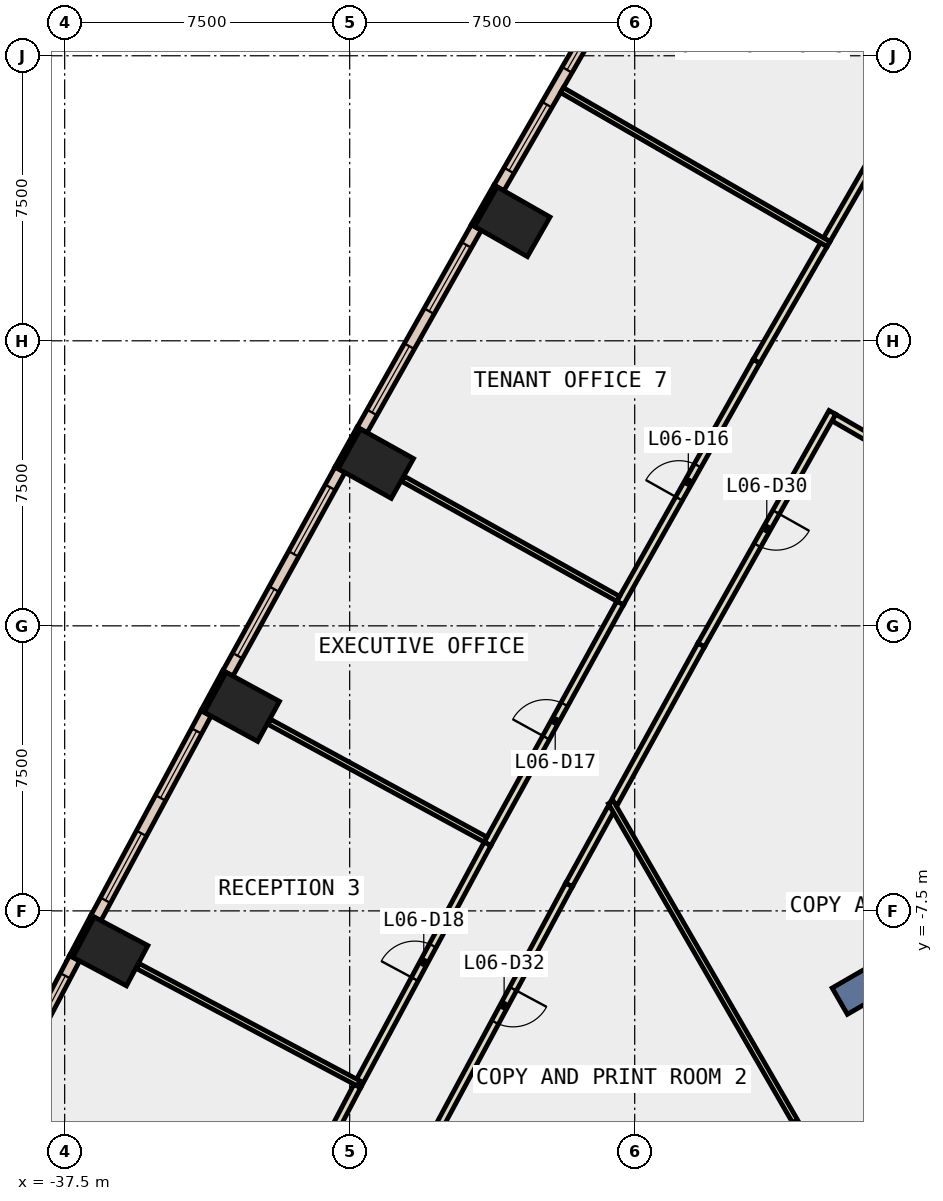
"""IFC4 building model, lengths in metres.
Left out: names, types, materials, properties, quantities, classifications, styles, units other than length and angle.
Written with IfcOpenShell. Run it as: python <this file> out.ifc"""

import sys

from ifc_helpers import new_model, si_unit, direction, frame, frame_2d, origin, origin_2d, place, context, subcontext, project, spatial, rectangle, extrude, element, fill, save


model = new_model("IFC4")
c1 = context("Model", 3, precision=1e-05, world=origin(), true_north=direction((0.0, 1.0)))
c2 = subcontext(c1, "Body", "Model", "MODEL_VIEW")
j1 = project(units=[si_unit("LENGTHUNIT", "METRE"), si_unit("PLANEANGLEUNIT", "RADIAN")], contexts=[c1])
p1 = place(None, origin())
s1 = spatial("IfcSite", under=j1, at=p1, CompositionType="ELEMENT")
p2 = place(p1, origin())
s2 = spatial("IfcBuilding", under=s1, at=p2, CompositionType="ELEMENT")
p3 = place(p2, frame((0.0, 0.0, 35.0)))
s3 = spatial("IfcBuildingStorey", under=s2, at=p3, CompositionType="ELEMENT", Elevation=35.0)
for number, where, z_axis, x_axis in (
    (1, (-25.721, 10.632, -0.6), (0.0, 0.0, 1.0), (0.496, 0.869, 0.0)),
    (2, (-29.311, 4.267, -0.6), (0.0, 0.0, 1.0), (0.487, 0.873, 0.0)),
    (3, (-32.837, -2.132, -0.6), (0.0, 0.0, 1.0), (0.478, 0.878, 0.0)),
    (4, (-36.298, -8.567, -0.6), (0.0, 0.0, 1.0), (0.469, 0.883, 0.0)),
):
    element("IfcColumn", number, at=place(p3, frame(where, z_axis=z_axis, x_axis=x_axis)), inside=s3, PredefinedType="COLUMN", context=c2, shape_type="SweptSolid", body=[
        extrude(rectangle(XDim=1.2, YDim=1.6, at=origin_2d()), origin(), (0.0, 0.0, 1.0), 4.4),
    ])
p4 = place(p3, frame((-9.31, -5.375, -0.6), z_axis=(0.0, 0.0, 1.0), x_axis=(-0.866017533419, -0.500013631625, 0.0)))
e5 = element("IfcWall", 5, at=p4, inside=s3, PredefinedType="SHEAR", context=c2, shape_type="SweptSolid", body=[
    extrude(rectangle(XDim=9.0, YDim=0.8, at=frame_2d((4.5, 0.0))), origin(), (0.0, 0.0, 1.0), 4.4),
])
p5 = place(p3, frame((-26.162, 11.574, 0.0), z_axis=(0.0, 0.0, 1.0), x_axis=(-0.495854054996, -0.868405870629, 0.0)))
e6 = element("IfcWall", 6, at=p5, inside=s3, PredefinedType="STANDARD", context=c2, shape_type="SweptSolid", body=[
    extrude(rectangle(XDim=1.2, YDim=0.1, at=frame_2d((0.6, 0.0))), origin(), (0.0, 0.0, 1.0), 3.8),
])
p6 = place(p3, frame((-29.761, 5.205, 0.0), z_axis=(0.0, 0.0, 1.0), x_axis=(-0.486730996044, -0.87355190887, 0.0)))
e7 = element("IfcWall", 7, at=p6, inside=s3, PredefinedType="STANDARD", context=c2, shape_type="SweptSolid", body=[
    extrude(rectangle(XDim=1.2, YDim=0.1, at=frame_2d((0.6, 0.0))), origin(), (0.0, 0.0, 1.0), 3.8),
])
p7 = place(p3, frame((-33.296, -1.199, 0.0), z_axis=(0.0, 0.0, 1.0), x_axis=(-0.478424520456, -0.878128679765, 0.0)))
e8 = element("IfcWall", 8, at=p7, inside=s3, PredefinedType="STANDARD", context=c2, shape_type="SweptSolid", body=[
    extrude(rectangle(XDim=1.2, YDim=0.1, at=frame_2d((0.6, 0.0))), origin(), (0.0, 0.0, 1.0), 3.8),
])
p8 = place(p3, frame((-36.767, -7.639, 0.0), z_axis=(0.0, 0.0, 1.0), x_axis=(-0.469383408131, -0.882994459876, 0.0)))
e9 = element("IfcWall", 9, at=p8, inside=s3, PredefinedType="STANDARD", context=c2, shape_type="SweptSolid", body=[
    extrude(rectangle(XDim=1.199, YDim=0.1, at=frame_2d((0.6, 0.0))), origin(), (0.0, 0.0, 1.0), 3.8),
])
p9 = place(p3, frame((-23.015, 16.819, 0.0), z_axis=(0.0, 0.0, 1.0), x_axis=(-0.499976985038, -0.866038691071, 0.0)))
e10 = element("IfcWall", 10, at=p9, inside=s3, PredefinedType="STANDARD", context=c2, shape_type="SweptSolid", body=[
    extrude(rectangle(XDim=6.116, YDim=0.3, at=frame_2d((3.058, 0.0))), origin(), (0.0, 0.0, 1.0), 3.8),
])
p10 = place(p9, frame((0.529, 0.0, 0.9)))
e11 = element("IfcOpeningElement", 11, at=p10, cuts=e10, PredefinedType="OPENING", context=c2, shape_type="SweptSolid", body=[
    extrude(rectangle(XDim=2.0, YDim=2.6, at=frame_2d((1.0, 1.3))), frame((0.0, 0.16, 0.0), z_axis=(0.0, -1.0, 0.0), x_axis=(1.0, 0.0, 0.0)), (0.0, 0.0, 1.0), 0.32),
])
p11 = place(p9, frame((3.587, 0.0, 0.9)))
e12 = element("IfcOpeningElement", 12, at=p11, cuts=e10, PredefinedType="OPENING", context=c2, shape_type="SweptSolid", body=[
    extrude(rectangle(XDim=2.0, YDim=2.6, at=frame_2d((1.0, 1.3))), frame((0.0, 0.16, 0.0), z_axis=(0.0, -1.0, 0.0), x_axis=(1.0, 0.0, 0.0)), (0.0, 0.0, 1.0), 0.32),
])
p12 = place(p3, frame((-26.667, 10.482, 0.0), z_axis=(0.0, 0.0, 1.0), x_axis=(-0.491278487323, -0.871002553322, 0.0)))
e13 = element("IfcWall", 13, at=p12, inside=s3, PredefinedType="STANDARD", context=c2, shape_type="SweptSolid", body=[
    extrude(rectangle(XDim=6.117, YDim=0.3, at=frame_2d((3.059, 0.0))), origin(), (0.0, 0.0, 1.0), 3.8),
])
p13 = place(p12, frame((0.529, 0.0, 0.9)))
e14 = element("IfcOpeningElement", 14, at=p13, cuts=e13, PredefinedType="OPENING", context=c2, shape_type="SweptSolid", body=[
    extrude(rectangle(XDim=2.0, YDim=2.6, at=frame_2d((1.0, 1.3))), frame((0.0, 0.16, 0.0), z_axis=(0.0, -1.0, 0.0), x_axis=(1.0, 0.0, 0.0)), (0.0, 0.0, 1.0), 0.32),
])
p14 = place(p12, frame((3.588, 0.0, 0.9)))
e15 = element("IfcOpeningElement", 15, at=p14, cuts=e13, PredefinedType="OPENING", context=c2, shape_type="SweptSolid", body=[
    extrude(rectangle(XDim=2.0, YDim=2.6, at=frame_2d((1.0, 1.3))), frame((0.0, 0.16, 0.0), z_axis=(0.0, -1.0, 0.0), x_axis=(1.0, 0.0, 0.0)), (0.0, 0.0, 1.0), 0.32),
])
p15 = place(p3, frame((-30.255, 4.107, 0.0), z_axis=(0.0, 0.0, 1.0), x_axis=(-0.482596003603, -0.875843078015, 0.0)))
e16 = element("IfcWall", 16, at=p15, inside=s3, PredefinedType="STANDARD", context=c2, shape_type="SweptSolid", body=[
    extrude(rectangle(XDim=6.115, YDim=0.3, at=frame_2d((3.058, 0.0))), origin(), (0.0, 0.0, 1.0), 3.8),
])
p16 = place(p15, frame((0.529, 0.0, 0.9)))
e17 = element("IfcOpeningElement", 17, at=p16, cuts=e16, PredefinedType="OPENING", context=c2, shape_type="SweptSolid", body=[
    extrude(rectangle(XDim=2.0, YDim=2.6, at=frame_2d((1.0, 1.3))), frame((0.0, 0.16, 0.0), z_axis=(0.0, -1.0, 0.0), x_axis=(1.0, 0.0, 0.0)), (0.0, 0.0, 1.0), 0.32),
])
p17 = place(p15, frame((3.586, 0.0, 0.9)))
e18 = element("IfcOpeningElement", 18, at=p17, cuts=e16, PredefinedType="OPENING", context=c2, shape_type="SweptSolid", body=[
    extrude(rectangle(XDim=2.0, YDim=2.6, at=frame_2d((1.0, 1.3))), frame((0.0, 0.16, 0.0), z_axis=(0.0, -1.0, 0.0), x_axis=(1.0, 0.0, 0.0)), (0.0, 0.0, 1.0), 0.32),
])
p18 = place(p3, frame((-33.779, -2.301, 0.0), z_axis=(0.0, 0.0, 1.0), x_axis=(-0.47375467653, -0.880656860795, 0.0)))
e19 = element("IfcWall", 19, at=p18, inside=s3, PredefinedType="STANDARD", context=c2, shape_type="SweptSolid", body=[
    extrude(rectangle(XDim=6.117, YDim=0.3, at=frame_2d((3.059, 0.0))), origin(), (0.0, 0.0, 1.0), 3.8),
])
p19 = place(p18, frame((0.529, 0.0, 0.9)))
e20 = element("IfcOpeningElement", 20, at=p19, cuts=e19, PredefinedType="OPENING", context=c2, shape_type="SweptSolid", body=[
    extrude(rectangle(XDim=2.0, YDim=2.6, at=frame_2d((1.0, 1.3))), frame((0.0, 0.16, 0.0), z_axis=(0.0, -1.0, 0.0), x_axis=(1.0, 0.0, 0.0)), (0.0, 0.0, 1.0), 0.32),
])
p20 = place(p18, frame((3.588, 0.0, 0.9)))
e21 = element("IfcOpeningElement", 21, at=p20, cuts=e19, PredefinedType="OPENING", context=c2, shape_type="SweptSolid", body=[
    extrude(rectangle(XDim=2.0, YDim=2.6, at=frame_2d((1.0, 1.3))), frame((0.0, 0.16, 0.0), z_axis=(0.0, -1.0, 0.0), x_axis=(1.0, 0.0, 0.0)), (0.0, 0.0, 1.0), 0.32),
])
p21 = place(p3, frame((-37.239, -8.746, 0.0), z_axis=(0.0, 0.0, 1.0), x_axis=(-0.464913987781, -0.885355851602, 0.0)))
e22 = element("IfcWall", 22, at=p21, inside=s3, PredefinedType="STANDARD", context=c2, shape_type="SweptSolid", body=[
    extrude(rectangle(XDim=6.094, YDim=0.3, at=frame_2d((3.047, 0.0))), origin(), (0.0, 0.0, 1.0), 3.8),
])
p22 = place(p21, frame((0.523, 0.0, 0.9)))
e23 = element("IfcOpeningElement", 23, at=p22, cuts=e22, PredefinedType="OPENING", context=c2, shape_type="SweptSolid", body=[
    extrude(rectangle(XDim=2.0, YDim=2.6, at=frame_2d((1.0, 1.3))), frame((0.0, 0.16, 0.0), z_axis=(0.0, -1.0, 0.0), x_axis=(1.0, 0.0, 0.0)), (0.0, 0.0, 1.0), 0.32),
])
p23 = place(p21, frame((3.57, 0.0, 0.9)))
e24 = element("IfcOpeningElement", 24, at=p23, cuts=e22, PredefinedType="OPENING", context=c2, shape_type="SweptSolid", body=[
    extrude(rectangle(XDim=2.0, YDim=2.6, at=frame_2d((1.0, 1.3))), frame((0.0, 0.16, 0.0), z_axis=(0.0, -1.0, 0.0), x_axis=(1.0, 0.0, 0.0)), (0.0, 0.0, 1.0), 0.32),
])
p24 = place(p3, frame((-17.261, 5.48, 0.0), z_axis=(0.0, 0.0, 1.0), x_axis=(0.865949187497, -0.500131987253, 0.0)))
e25 = element("IfcWall", 25, at=p24, inside=s3, PredefinedType="PARTITIONING", context=c2, shape_type="SweptSolid", body=[
    extrude(rectangle(XDim=3.939, YDim=0.2, at=frame_2d((1.969, 0.0))), origin(), (0.0, 0.0, 1.0), 3.8),
])
p25 = place(p3, frame((-17.299, 5.617, 0.0), z_axis=(0.0, 0.0, 1.0), x_axis=(-0.491166441632, -0.871065741844, 0.0)))
e26 = element("IfcWall", 26, at=p25, inside=s3, PredefinedType="PARTITIONING", context=c2, shape_type="SweptSolid", body=[
    extrude(rectangle(XDim=7.028, YDim=0.2, at=frame_2d((3.514, 0.0))), origin(), (0.0, 0.0, 1.0), 3.8),
])
p26 = place(p25, frame((3.014, 0.0, 0.0)))
e27 = element("IfcOpeningElement", 27, at=p26, cuts=e26, PredefinedType="OPENING", context=c2, shape_type="SweptSolid", body=[
    extrude(rectangle(XDim=1.0, YDim=2.1, at=frame_2d((0.5, 1.05))), frame((0.0, 0.11, 0.0), z_axis=(0.0, -1.0, 0.0), x_axis=(1.0, 0.0, 0.0)), (0.0, 0.0, 1.0), 0.22),
])
p27 = place(p3, frame((-20.751, -0.505, 0.0), z_axis=(0.0, 0.0, 1.0), x_axis=(-0.482566110981, -0.875859548405, 0.0)))
e28 = element("IfcWall", 28, at=p27, inside=s3, PredefinedType="PARTITIONING", context=c2, shape_type="SweptSolid", body=[
    extrude(rectangle(XDim=4.748, YDim=0.2, at=frame_2d((2.374, 0.0))), origin(), (0.0, 0.0, 1.0), 3.8),
])
p28 = place(p3, frame((-23.114, -4.794, 0.0), z_axis=(0.0, 0.0, 1.0), x_axis=(-0.482482362329, -0.875905685586, 0.0)))
e29 = element("IfcWall", 29, at=p28, inside=s3, PredefinedType="PARTITIONING", context=c2, shape_type="SweptSolid", body=[
    extrude(rectangle(XDim=2.311, YDim=0.2, at=frame_2d((1.156, 0.0))), origin(), (0.0, 0.0, 1.0), 3.8),
])
p29 = place(p3, frame((-24.229, -6.818, 0.0), z_axis=(0.0, 0.0, 1.0), x_axis=(-0.473714049803, -0.88067871498, 0.0)))
e30 = element("IfcWall", 30, at=p29, inside=s3, PredefinedType="PARTITIONING", context=c2, shape_type="SweptSolid", body=[
    extrude(rectangle(XDim=7.209, YDim=0.2, at=frame_2d((3.604, 0.0))), origin(), (0.0, 0.0, 1.0), 3.8),
])
p30 = place(p29, frame((3.104, 0.0, 0.0)))
e31 = element("IfcOpeningElement", 31, at=p30, cuts=e30, PredefinedType="OPENING", context=c2, shape_type="SweptSolid", body=[
    extrude(rectangle(XDim=1.0, YDim=2.1, at=frame_2d((0.5, 1.05))), frame((0.0, 0.11, 0.0), z_axis=(0.0, -1.0, 0.0), x_axis=(1.0, 0.0, 0.0)), (0.0, 0.0, 1.0), 0.22),
])
p31 = place(p3, frame((-17.448, 10.16, 0.0), z_axis=(0.0, 0.0, 1.0), x_axis=(0.499951278228, 0.866053531485, 0.0)))
e32 = element("IfcWall", 32, at=p31, inside=s3, PredefinedType="PARTITIONING", context=c2, shape_type="SweptSolid", body=[
    extrude(rectangle(XDim=3.54, YDim=0.2, at=frame_2d((1.77, 0.0))), origin(), (0.0, 0.0, 1.0), 3.8),
])
p32 = place(p3, frame((-22.884, 0.598, 0.0), z_axis=(0.0, 0.0, 1.0), x_axis=(0.491206176175, 0.871043335597, 0.0)))
e33 = element("IfcWall", 33, at=p32, inside=s3, PredefinedType="PARTITIONING", context=c2, shape_type="SweptSolid", body=[
    extrude(rectangle(XDim=7.309, YDim=0.2, at=frame_2d((3.654, 0.0))), origin(), (0.0, 0.0, 1.0), 3.8),
])
p33 = place(p32, frame((3.154, 0.0, 0.0)))
e34 = element("IfcOpeningElement", 34, at=p33, cuts=e33, PredefinedType="OPENING", context=c2, shape_type="SweptSolid", body=[
    extrude(rectangle(XDim=1.0, YDim=2.1, at=frame_2d((0.5, 1.05))), frame((0.0, 0.11, 0.0), z_axis=(0.0, -1.0, 0.0), x_axis=(1.0, 0.0, 0.0)), (0.0, 0.0, 1.0), 0.22),
])
p34 = place(p3, frame((-19.294, 6.964, 0.0), z_axis=(0.0, 0.0, 1.0), x_axis=(0.499861717316, 0.86610522661, 0.0)))
e35 = element("IfcWall", 35, at=p34, inside=s3, PredefinedType="PARTITIONING", context=c2, shape_type="SweptSolid", body=[
    extrude(rectangle(XDim=3.541, YDim=0.2, at=frame_2d((1.771, 0.0))), origin(), (0.0, 0.0, 1.0), 3.8),
])
p35 = place(p3, frame((-26.373, -5.736, 0.0), z_axis=(0.0, 0.0, 1.0), x_axis=(0.482587313112, 0.875847866483, 0.0)))
e36 = element("IfcWall", 36, at=p35, inside=s3, PredefinedType="PARTITIONING", context=c2, shape_type="SweptSolid", body=[
    extrude(rectangle(XDim=7.232, YDim=0.2, at=frame_2d((3.616, 0.0))), origin(), (0.0, 0.0, 1.0), 3.8),
])
p36 = place(p35, frame((3.191, 0.0, 0.0)))
e37 = element("IfcOpeningElement", 37, at=p36, cuts=e36, PredefinedType="OPENING", context=c2, shape_type="SweptSolid", body=[
    extrude(rectangle(XDim=1.0, YDim=2.1, at=frame_2d((0.5, 1.05))), frame((0.0, 0.11, 0.0), z_axis=(0.0, -1.0, 0.0), x_axis=(1.0, 0.0, 0.0)), (0.0, 0.0, 1.0), 0.22),
])
p37 = place(p3, frame((-29.799, -12.106, 0.0), z_axis=(0.0, 0.0, 1.0), x_axis=(0.473681086062, 0.880696445268, 0.0)))
e38 = element("IfcWall", 38, at=p37, inside=s3, PredefinedType="PARTITIONING", context=c2, shape_type="SweptSolid", body=[
    extrude(rectangle(XDim=7.233, YDim=0.2, at=frame_2d((3.616, 0.0))), origin(), (0.0, 0.0, 1.0), 3.8),
])
p38 = place(p37, frame((3.191, 0.0, 0.0)))
e39 = element("IfcOpeningElement", 39, at=p38, cuts=e38, PredefinedType="OPENING", context=c2, shape_type="SweptSolid", body=[
    extrude(rectangle(XDim=1.0, YDim=2.1, at=frame_2d((0.5, 1.05))), frame((0.0, 0.11, 0.0), z_axis=(0.0, -1.0, 0.0), x_axis=(1.0, 0.0, 0.0)), (0.0, 0.0, 1.0), 0.22),
])
p39 = place(p3, frame((-32.696, -17.626, 0.0), z_axis=(0.0, 0.0, 1.0), x_axis=(0.464767882002, 0.885432558617, 0.0)))
e40 = element("IfcWall", 40, at=p39, inside=s3, PredefinedType="PARTITIONING", context=c2, shape_type="SweptSolid", body=[
    extrude(rectangle(XDim=6.233, YDim=0.2, at=frame_2d((3.117, 0.0))), origin(), (0.0, 0.0, 1.0), 3.8),
])
p40 = place(p39, frame((2.654, 0.0, 0.0)))
e41 = element("IfcOpeningElement", 41, at=p40, cuts=e40, PredefinedType="OPENING", context=c2, shape_type="SweptSolid", body=[
    extrude(rectangle(XDim=1.0, YDim=2.1, at=frame_2d((0.5, 1.05))), frame((0.0, 0.11, 0.0), z_axis=(0.0, -1.0, 0.0), x_axis=(1.0, 0.0, 0.0)), (0.0, 0.0, 1.0), 0.22),
])
p41 = place(p3, frame((-18.182, -13.207, 0.0), z_axis=(0.0, 0.0, 1.0), x_axis=(-0.500081416649, 0.865978392757, 0.0)))
e42 = element("IfcWall", 42, at=p41, inside=s3, PredefinedType="PARTITIONING", context=c2, shape_type="SweptSolid", body=[
    extrude(rectangle(XDim=9.89, YDim=0.15, at=frame_2d((4.945, 0.0))), origin(), (0.0, 0.0, 1.0), 3.8),
])
p42 = place(p3, frame((-18.211, -13.108, 0.0), z_axis=(0.0, 0.0, 1.0), x_axis=(-0.865421721769, -0.501044153235, 0.0)))
e43 = element("IfcWall", 43, at=p42, inside=s3, PredefinedType="PARTITIONING", context=c2, shape_type="SweptSolid", body=[
    extrude(rectangle(XDim=8.546, YDim=0.2, at=frame_2d((4.273, 0.0))), origin(), (0.0, 0.0, 1.0), 3.8),
])
p43 = place(p3, frame((-17.399, 10.045, 0.0), z_axis=(0.0, 0.0, 1.0), x_axis=(-0.865980803489, 0.500077242023, 0.0)))
e44 = element("IfcWall", 44, at=p43, inside=s3, PredefinedType="PARTITIONING", context=c2, shape_type="SweptSolid", body=[
    extrude(rectangle(XDim=8.101, YDim=0.15, at=frame_2d((4.05, 0.0))), origin(), (0.0, 0.0, 1.0), 3.8),
])
p44 = place(p3, frame((-22.935, 0.712, 0.0), z_axis=(0.0, 0.0, 1.0), x_axis=(-0.873395616379, 0.487011393389, 0.0)))
e45 = element("IfcWall", 45, at=p44, inside=s3, PredefinedType="PARTITIONING", context=c2, shape_type="SweptSolid", body=[
    extrude(rectangle(XDim=6.48, YDim=0.15, at=frame_2d((3.24, 0.0))), origin(), (0.0, 0.0, 1.0), 3.8),
])
p45 = place(p3, frame((-26.425, -5.623, 0.0), z_axis=(0.0, 0.0, 1.0), x_axis=(-0.87825523631, 0.478192157919, 0.0)))
e46 = element("IfcWall", 46, at=p45, inside=s3, PredefinedType="PARTITIONING", context=c2, shape_type="SweptSolid", body=[
    extrude(rectangle(XDim=6.481, YDim=0.15, at=frame_2d((3.24, 0.0))), origin(), (0.0, 0.0, 1.0), 3.8),
])
p46 = place(p3, frame((-29.764, -12.04, 0.0), z_axis=(0.0, 0.0, 1.0), x_axis=(-0.883018657393, 0.469337885426, 0.0)))
e47 = element("IfcWall", 47, at=p46, inside=s3, PredefinedType="PARTITIONING", context=c2, shape_type="SweptSolid", body=[
    extrude(rectangle(XDim=6.58, YDim=0.15, at=frame_2d((3.29, 0.0))), origin(), (0.0, 0.0, 1.0), 3.8),
])
p47 = place(p10, origin())
e48 = element("IfcWindow", 48, at=p47, inside=s3, PartitioningType="SINGLE_PANEL", PredefinedType="WINDOW", context=c2, shape_type="SweptSolid", body=[
    extrude(rectangle(XDim=2.0, YDim=2.6, at=frame_2d((1.0, 1.3))), frame((0.0, 0.03, 0.0), z_axis=(0.0, -1.0, 0.0), x_axis=(1.0, 0.0, 0.0)), (0.0, 0.0, 1.0), 0.06),
])
fill(e11, e48)
p48 = place(p11, origin())
e49 = element("IfcWindow", 49, at=p48, inside=s3, PartitioningType="SINGLE_PANEL", PredefinedType="WINDOW", context=c2, shape_type="SweptSolid", body=[
    extrude(rectangle(XDim=2.0, YDim=2.6, at=frame_2d((1.0, 1.3))), frame((0.0, 0.03, 0.0), z_axis=(0.0, -1.0, 0.0), x_axis=(1.0, 0.0, 0.0)), (0.0, 0.0, 1.0), 0.06),
])
fill(e12, e49)
p49 = place(p13, origin())
e50 = element("IfcWindow", 50, at=p49, inside=s3, PartitioningType="SINGLE_PANEL", PredefinedType="WINDOW", context=c2, shape_type="SweptSolid", body=[
    extrude(rectangle(XDim=2.0, YDim=2.6, at=frame_2d((1.0, 1.3))), frame((0.0, 0.03, 0.0), z_axis=(0.0, -1.0, 0.0), x_axis=(1.0, 0.0, 0.0)), (0.0, 0.0, 1.0), 0.06),
])
fill(e14, e50)
p50 = place(p14, origin())
e51 = element("IfcWindow", 51, at=p50, inside=s3, PartitioningType="SINGLE_PANEL", PredefinedType="WINDOW", context=c2, shape_type="SweptSolid", body=[
    extrude(rectangle(XDim=2.0, YDim=2.6, at=frame_2d((1.0, 1.3))), frame((0.0, 0.03, 0.0), z_axis=(0.0, -1.0, 0.0), x_axis=(1.0, 0.0, 0.0)), (0.0, 0.0, 1.0), 0.06),
])
fill(e15, e51)
p51 = place(p16, origin())
e52 = element("IfcWindow", 52, at=p51, inside=s3, PartitioningType="SINGLE_PANEL", PredefinedType="WINDOW", context=c2, shape_type="SweptSolid", body=[
    extrude(rectangle(XDim=2.0, YDim=2.6, at=frame_2d((1.0, 1.3))), frame((0.0, 0.03, 0.0), z_axis=(0.0, -1.0, 0.0), x_axis=(1.0, 0.0, 0.0)), (0.0, 0.0, 1.0), 0.06),
])
fill(e17, e52)
p52 = place(p17, origin())
e53 = element("IfcWindow", 53, at=p52, inside=s3, PartitioningType="SINGLE_PANEL", PredefinedType="WINDOW", context=c2, shape_type="SweptSolid", body=[
    extrude(rectangle(XDim=2.0, YDim=2.6, at=frame_2d((1.0, 1.3))), frame((0.0, 0.03, 0.0), z_axis=(0.0, -1.0, 0.0), x_axis=(1.0, 0.0, 0.0)), (0.0, 0.0, 1.0), 0.06),
])
fill(e18, e53)
p53 = place(p19, origin())
e54 = element("IfcWindow", 54, at=p53, inside=s3, PartitioningType="SINGLE_PANEL", PredefinedType="WINDOW", context=c2, shape_type="SweptSolid", body=[
    extrude(rectangle(XDim=2.0, YDim=2.6, at=frame_2d((1.0, 1.3))), frame((0.0, 0.03, 0.0), z_axis=(0.0, -1.0, 0.0), x_axis=(1.0, 0.0, 0.0)), (0.0, 0.0, 1.0), 0.06),
])
fill(e20, e54)
p54 = place(p20, origin())
e55 = element("IfcWindow", 55, at=p54, inside=s3, PartitioningType="SINGLE_PANEL", PredefinedType="WINDOW", context=c2, shape_type="SweptSolid", body=[
    extrude(rectangle(XDim=2.0, YDim=2.6, at=frame_2d((1.0, 1.3))), frame((0.0, 0.03, 0.0), z_axis=(0.0, -1.0, 0.0), x_axis=(1.0, 0.0, 0.0)), (0.0, 0.0, 1.0), 0.06),
])
fill(e21, e55)
p55 = place(p22, origin())
e56 = element("IfcWindow", 56, at=p55, inside=s3, PartitioningType="SINGLE_PANEL", PredefinedType="WINDOW", context=c2, shape_type="SweptSolid", body=[
    extrude(rectangle(XDim=2.0, YDim=2.6, at=frame_2d((1.0, 1.3))), frame((0.0, 0.03, 0.0), z_axis=(0.0, -1.0, 0.0), x_axis=(1.0, 0.0, 0.0)), (0.0, 0.0, 1.0), 0.06),
])
fill(e23, e56)
p56 = place(p33, origin())
e57 = element("IfcDoor", 57, at=p56, inside=s3, OperationType="SINGLE_SWING_RIGHT", PredefinedType="DOOR", context=c2, shape_type="SweptSolid", body=[
    extrude(rectangle(XDim=1.0, YDim=2.1, at=frame_2d((0.5, 1.05))), frame((0.0, 0.025, 0.0), z_axis=(0.0, -1.0, 0.0), x_axis=(1.0, 0.0, 0.0)), (0.0, 0.0, 1.0), 0.05),
])
fill(e34, e57)
p57 = place(p36, origin())
e58 = element("IfcDoor", 58, at=p57, inside=s3, OperationType="SINGLE_SWING_LEFT", PredefinedType="DOOR", context=c2, shape_type="SweptSolid", body=[
    extrude(rectangle(XDim=1.0, YDim=2.1, at=frame_2d((0.5, 1.05))), frame((0.0, 0.025, 0.0), z_axis=(0.0, -1.0, 0.0), x_axis=(1.0, 0.0, 0.0)), (0.0, 0.0, 1.0), 0.05),
])
fill(e37, e58)
p58 = place(p38, origin())
e59 = element("IfcDoor", 59, at=p58, inside=s3, OperationType="SINGLE_SWING_RIGHT", PredefinedType="DOOR", context=c2, shape_type="SweptSolid", body=[
    extrude(rectangle(XDim=1.0, YDim=2.1, at=frame_2d((0.5, 1.05))), frame((0.0, 0.025, 0.0), z_axis=(0.0, -1.0, 0.0), x_axis=(1.0, 0.0, 0.0)), (0.0, 0.0, 1.0), 0.05),
])
fill(e39, e59)
p59 = place(p26, origin())
e60 = element("IfcDoor", 60, at=p59, inside=s3, OperationType="SINGLE_SWING_RIGHT", PredefinedType="DOOR", context=c2, shape_type="SweptSolid", body=[
    extrude(rectangle(XDim=1.0, YDim=2.1, at=frame_2d((0.5, 1.05))), frame((0.0, 0.025, 0.0), z_axis=(0.0, -1.0, 0.0), x_axis=(1.0, 0.0, 0.0)), (0.0, 0.0, 1.0), 0.05),
])
fill(e27, e60)
p60 = place(p30, origin())
e61 = element("IfcDoor", 61, at=p60, inside=s3, OperationType="SINGLE_SWING_RIGHT", PredefinedType="DOOR", context=c2, shape_type="SweptSolid", body=[
    extrude(rectangle(XDim=1.0, YDim=2.1, at=frame_2d((0.5, 1.05))), frame((0.0, 0.025, 0.0), z_axis=(0.0, -1.0, 0.0), x_axis=(1.0, 0.0, 0.0)), (0.0, 0.0, 1.0), 0.05),
])
fill(e31, e61)
save(model, sys.argv[1])
